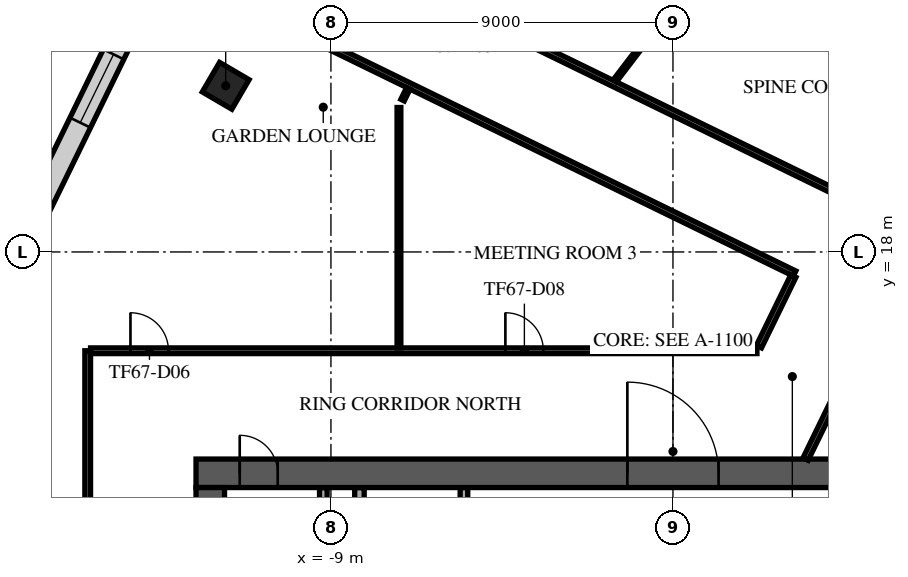
"""IFC4 building model, lengths in metres.
Left out: names, types, materials, properties, quantities, classifications, styles, units other than length and angle.
Written with IfcOpenShell. Run it as: python <this file> out.ifc"""

import sys

from ifc_helpers import new_model, si_unit, direction, frame, frame_2d, origin, origin_2d, place, context, subcontext, project, spatial, rectangle, extrude, element, fill, save


model = new_model("IFC4")
c1 = context("Model", 3, precision=1e-05, world=origin(), true_north=direction((0.0, 1.0)))
c2 = subcontext(c1, "Body", "Model", "MODEL_VIEW")
j1 = project(units=[si_unit("LENGTHUNIT", "METRE"), si_unit("PLANEANGLEUNIT", "RADIAN")], contexts=[c1])
p1 = place(None, origin())
s1 = spatial("IfcSite", under=j1, at=p1, CompositionType="ELEMENT")
p2 = place(p1, origin())
s2 = spatial("IfcBuilding", under=s1, at=p2, CompositionType="ELEMENT")
p3 = place(p2, frame((0.0, 0.0, 282.9)))
s3 = spatial("IfcBuildingStorey", under=s2, at=p3, CompositionType="ELEMENT", Elevation=282.9)
p4 = place(p3, frame((-11.769, 22.372, 0.0), z_axis=(0.0, 0.0, 1.0), x_axis=(0.504643651291, 0.863327739165, 0.0)))
e1 = element("IfcColumn", 1, at=p4, inside=s3, PredefinedType="COLUMN", context=c2, shape_type="SweptSolid", body=[
    extrude(rectangle(XDim=0.9, YDim=0.9, at=origin_2d()), origin(), (0.0, 0.0, 1.0), 4.0),
])
p5 = place(p3, frame((-12.55, 12.175, 0.0), z_axis=(0.0, 0.0, 1.0), x_axis=(1.0, 0.0, 0.0)))
e2 = element("IfcWall", 2, at=p5, inside=s3, PredefinedType="SHEAR", context=c2, shape_type="SweptSolid", body=[
    extrude(rectangle(XDim=25.1, YDim=0.75, at=frame_2d((12.55, 0.0))), origin(), (0.0, 0.0, 1.0), 3.64),
])
p6 = place(p5, frame((11.35, 0.0, 0.0)))
e3 = element("IfcOpeningElement", 3, at=p6, cuts=e2, PredefinedType="OPENING", context=c2, shape_type="SweptSolid", body=[
    extrude(rectangle(XDim=2.4, YDim=2.4, at=frame_2d((1.2, 1.2))), frame((0.0, 0.385, 0.0), z_axis=(0.0, -1.0, 0.0), x_axis=(1.0, 0.0, 0.0)), (0.0, 0.0, 1.0), 0.77),
])
p7 = place(p5, frame((22.175, 0.0, 0.0)))
e4 = element("IfcOpeningElement", 4, at=p7, cuts=e2, PredefinedType="OPENING", context=c2, shape_type="SweptSolid", body=[
    extrude(rectangle(XDim=1.2, YDim=2.1, at=frame_2d((0.6, 1.05))), frame((0.0, 0.385, 0.0), z_axis=(0.0, -1.0, 0.0), x_axis=(1.0, 0.0, 0.0)), (0.0, 0.0, 1.0), 0.77),
])
p8 = place(p5, frame((1.15, 0.0, 0.0)))
e5 = element("IfcOpeningElement", 5, at=p8, cuts=e2, PredefinedType="OPENING", context=c2, shape_type="SweptSolid", body=[
    extrude(rectangle(XDim=1.0, YDim=2.1, at=frame_2d((0.5, 1.05))), frame((0.0, 0.385, 0.0), z_axis=(0.0, -1.0, 0.0), x_axis=(1.0, 0.0, 0.0)), (0.0, 0.0, 1.0), 0.77),
])
p9 = place(p3, frame((-12.175, -11.8, 0.0), z_axis=(0.0, 0.0, 1.0), x_axis=(0.0, 1.0, 0.0)))
e6 = element("IfcWall", 6, at=p9, inside=s3, PredefinedType="SHEAR", context=c2, shape_type="SweptSolid", body=[
    extrude(rectangle(XDim=23.6, YDim=0.75, at=frame_2d((11.8, 0.0))), origin(), (0.0, 0.0, 1.0), 3.64),
])
p10 = place(p9, frame((10.6, 0.0, 0.0)))
e7 = element("IfcOpeningElement", 7, at=p10, cuts=e6, PredefinedType="OPENING", context=c2, shape_type="SweptSolid", body=[
    extrude(rectangle(XDim=2.4, YDim=2.4, at=frame_2d((1.2, 1.2))), frame((0.0, 0.385, 0.0), z_axis=(0.0, -1.0, 0.0), x_axis=(1.0, 0.0, 0.0)), (0.0, 0.0, 1.0), 0.77),
])
p11 = place(p3, frame((-9.2, 4.78, 0.0), z_axis=(0.0, 0.0, 1.0), x_axis=(0.0, 1.0, 0.0)))
e8 = element("IfcWall", 8, at=p11, inside=s3, PredefinedType="PARTITIONING", context=c2, shape_type="SweptSolid", body=[
    extrude(rectangle(XDim=7.015, YDim=0.2, at=frame_2d((3.507, 0.0))), origin(), (0.0, 0.0, 1.0), 3.64),
])
p12 = place(p11, frame((2.92, 0.0, 0.0)))
e9 = element("IfcOpeningElement", 9, at=p12, cuts=e8, PredefinedType="OPENING", context=c2, shape_type="SweptSolid", body=[
    extrude(rectangle(XDim=1.0, YDim=2.1, at=frame_2d((0.5, 1.05))), frame((0.0, 0.11, 0.0), z_axis=(0.0, -1.0, 0.0), x_axis=(1.0, 0.0, 0.0)), (0.0, 0.0, 1.0), 0.22),
])
p13 = place(p3, frame((-8.25, 8.805, 0.0), z_axis=(0.0, 0.0, 1.0), x_axis=(0.0, 1.0, 0.0)))
e10 = element("IfcWall", 10, at=p13, inside=s3, PredefinedType="PARTITIONING", context=c2, shape_type="SweptSolid", body=[
    extrude(rectangle(XDim=2.99, YDim=0.25, at=frame_2d((1.495, 0.0))), origin(), (0.0, 0.0, 1.0), 3.64),
])
p14 = place(p13, frame((0.895, 0.0, 0.0)))
e11 = element("IfcOpeningElement", 11, at=p14, cuts=e10, PredefinedType="OPENING", context=c2, shape_type="SweptSolid", body=[
    extrude(rectangle(XDim=1.0, YDim=2.1, at=frame_2d((0.5, 1.05))), frame((0.0, 0.135, 0.0), z_axis=(0.0, -1.0, 0.0), x_axis=(1.0, 0.0, 0.0)), (0.0, 0.0, 1.0), 0.27),
])
p15 = place(p3, frame((-5.5, 8.805, 0.0), z_axis=(0.0, 0.0, 1.0), x_axis=(0.0, 1.0, 0.0)))
e12 = element("IfcWall", 12, at=p15, inside=s3, PredefinedType="PARTITIONING", context=c2, shape_type="SweptSolid", body=[
    extrude(rectangle(XDim=2.99, YDim=0.2, at=frame_2d((1.495, 0.0))), origin(), (0.0, 0.0, 1.0), 3.64),
])
p16 = place(p15, frame((0.532, 0.0, 0.0)))
e13 = element("IfcOpeningElement", 13, at=p16, cuts=e12, PredefinedType="OPENING", context=c2, shape_type="SweptSolid", body=[
    extrude(rectangle(XDim=1.8, YDim=2.1, at=frame_2d((0.9, 1.05))), frame((0.0, 0.11, 0.0), z_axis=(0.0, -1.0, 0.0), x_axis=(1.0, 0.0, 0.0)), (0.0, 0.0, 1.0), 0.22),
])
p17 = place(p3, frame((-10.292, 32.278, 0.0), z_axis=(0.0, 0.0, 1.0), x_axis=(-0.438370550468, -0.898794337144, 0.0)))
e14 = element("IfcWall", 14, at=p17, inside=s3, PredefinedType="STANDARD", context=c2, shape_type="SweptSolid", body=[
    extrude(rectangle(XDim=48.843, YDim=0.6, at=frame_2d((24.421, 0.0))), origin(), (0.0, 0.0, 1.0), 3.64),
])
p18 = place(p17, frame((1.22, 0.0, 0.9)))
e15 = element("IfcOpeningElement", 15, at=p18, cuts=e14, PredefinedType="OPENING", context=c2, shape_type="SweptSolid", body=[
    extrude(rectangle(XDim=2.0, YDim=2.1, at=frame_2d((1.0, 1.05))), frame((0.0, 0.31, 0.0), z_axis=(0.0, -1.0, 0.0), x_axis=(1.0, 0.0, 0.0)), (0.0, 0.0, 1.0), 0.62),
])
p19 = place(p17, frame((5.66, 0.0, 0.9)))
e16 = element("IfcOpeningElement", 16, at=p19, cuts=e14, PredefinedType="OPENING", context=c2, shape_type="SweptSolid", body=[
    extrude(rectangle(XDim=2.0, YDim=2.1, at=frame_2d((1.0, 1.05))), frame((0.0, 0.31, 0.0), z_axis=(0.0, -1.0, 0.0), x_axis=(1.0, 0.0, 0.0)), (0.0, 0.0, 1.0), 0.62),
])
p20 = place(p17, frame((10.101, 0.0, 0.9)))
e17 = element("IfcOpeningElement", 17, at=p20, cuts=e14, PredefinedType="OPENING", context=c2, shape_type="SweptSolid", body=[
    extrude(rectangle(XDim=2.0, YDim=2.1, at=frame_2d((1.0, 1.05))), frame((0.0, 0.31, 0.0), z_axis=(0.0, -1.0, 0.0), x_axis=(1.0, 0.0, 0.0)), (0.0, 0.0, 1.0), 0.62),
])
p21 = place(p17, frame((14.541, 0.0, 0.9)))
e18 = element("IfcOpeningElement", 18, at=p21, cuts=e14, PredefinedType="OPENING", context=c2, shape_type="SweptSolid", body=[
    extrude(rectangle(XDim=2.0, YDim=2.1, at=frame_2d((1.0, 1.05))), frame((0.0, 0.31, 0.0), z_axis=(0.0, -1.0, 0.0), x_axis=(1.0, 0.0, 0.0)), (0.0, 0.0, 1.0), 0.62),
])
p22 = place(p17, frame((18.981, 0.0, 0.9)))
e19 = element("IfcOpeningElement", 19, at=p22, cuts=e14, PredefinedType="OPENING", context=c2, shape_type="SweptSolid", body=[
    extrude(rectangle(XDim=2.0, YDim=2.1, at=frame_2d((1.0, 1.05))), frame((0.0, 0.31, 0.0), z_axis=(0.0, -1.0, 0.0), x_axis=(1.0, 0.0, 0.0)), (0.0, 0.0, 1.0), 0.62),
])
p23 = place(p17, frame((23.422, 0.0, 0.9)))
e20 = element("IfcOpeningElement", 20, at=p23, cuts=e14, PredefinedType="OPENING", context=c2, shape_type="SweptSolid", body=[
    extrude(rectangle(XDim=2.0, YDim=2.1, at=frame_2d((1.0, 1.05))), frame((0.0, 0.31, 0.0), z_axis=(0.0, -1.0, 0.0), x_axis=(1.0, 0.0, 0.0)), (0.0, 0.0, 1.0), 0.62),
])
p24 = place(p17, frame((27.862, 0.0, 0.9)))
e21 = element("IfcOpeningElement", 21, at=p24, cuts=e14, PredefinedType="OPENING", context=c2, shape_type="SweptSolid", body=[
    extrude(rectangle(XDim=2.0, YDim=2.1, at=frame_2d((1.0, 1.05))), frame((0.0, 0.31, 0.0), z_axis=(0.0, -1.0, 0.0), x_axis=(1.0, 0.0, 0.0)), (0.0, 0.0, 1.0), 0.62),
])
p25 = place(p17, frame((32.302, 0.0, 0.9)))
e22 = element("IfcOpeningElement", 22, at=p25, cuts=e14, PredefinedType="OPENING", context=c2, shape_type="SweptSolid", body=[
    extrude(rectangle(XDim=2.0, YDim=2.1, at=frame_2d((1.0, 1.05))), frame((0.0, 0.31, 0.0), z_axis=(0.0, -1.0, 0.0), x_axis=(1.0, 0.0, 0.0)), (0.0, 0.0, 1.0), 0.62),
])
p26 = place(p17, frame((36.742, 0.0, 0.9)))
e23 = element("IfcOpeningElement", 23, at=p26, cuts=e14, PredefinedType="OPENING", context=c2, shape_type="SweptSolid", body=[
    extrude(rectangle(XDim=2.0, YDim=2.1, at=frame_2d((1.0, 1.05))), frame((0.0, 0.31, 0.0), z_axis=(0.0, -1.0, 0.0), x_axis=(1.0, 0.0, 0.0)), (0.0, 0.0, 1.0), 0.62),
])
p27 = place(p17, frame((41.183, 0.0, 0.9)))
e24 = element("IfcOpeningElement", 24, at=p27, cuts=e14, PredefinedType="OPENING", context=c2, shape_type="SweptSolid", body=[
    extrude(rectangle(XDim=2.0, YDim=2.1, at=frame_2d((1.0, 1.05))), frame((0.0, 0.31, 0.0), z_axis=(0.0, -1.0, 0.0), x_axis=(1.0, 0.0, 0.0)), (0.0, 0.0, 1.0), 0.62),
])
p28 = place(p17, frame((45.623, 0.0, 0.9)))
e25 = element("IfcOpeningElement", 25, at=p28, cuts=e14, PredefinedType="OPENING", context=c2, shape_type="SweptSolid", body=[
    extrude(rectangle(XDim=2.0, YDim=2.1, at=frame_2d((1.0, 1.05))), frame((0.0, 0.31, 0.0), z_axis=(0.0, -1.0, 0.0), x_axis=(1.0, 0.0, 0.0)), (0.0, 0.0, 1.0), 0.62),
])
p29 = place(p3, frame((29.237, 18.785, 0.0), z_axis=(0.0, 0.0, 1.0), x_axis=(-0.898794534192, 0.438370146458, 0.0)))
e26 = element("IfcWall", 26, at=p29, inside=s3, PredefinedType="STANDARD", context=c2, shape_type="SweptSolid", body=[
    extrude(rectangle(XDim=36.243, YDim=0.6, at=frame_2d((18.122, 0.0))), origin(), (0.0, 0.0, 1.0), 3.64),
])
p30 = place(p29, frame((1.215, 0.0, 0.9)))
e27 = element("IfcOpeningElement", 27, at=p30, cuts=e26, PredefinedType="OPENING", context=c2, shape_type="SweptSolid", body=[
    extrude(rectangle(XDim=2.1, YDim=2.1, at=frame_2d((1.05, 1.05))), frame((0.0, 0.31, 0.0), z_axis=(0.0, -1.0, 0.0), x_axis=(1.0, 0.0, 0.0)), (0.0, 0.0, 1.0), 0.62),
])
p31 = place(p29, frame((5.746, 0.0, 0.9)))
e28 = element("IfcOpeningElement", 28, at=p31, cuts=e26, PredefinedType="OPENING", context=c2, shape_type="SweptSolid", body=[
    extrude(rectangle(XDim=2.1, YDim=2.1, at=frame_2d((1.05, 1.05))), frame((0.0, 0.31, 0.0), z_axis=(0.0, -1.0, 0.0), x_axis=(1.0, 0.0, 0.0)), (0.0, 0.0, 1.0), 0.62),
])
p32 = place(p29, frame((10.276, 0.0, 0.9)))
e29 = element("IfcOpeningElement", 29, at=p32, cuts=e26, PredefinedType="OPENING", context=c2, shape_type="SweptSolid", body=[
    extrude(rectangle(XDim=2.1, YDim=2.1, at=frame_2d((1.05, 1.05))), frame((0.0, 0.31, 0.0), z_axis=(0.0, -1.0, 0.0), x_axis=(1.0, 0.0, 0.0)), (0.0, 0.0, 1.0), 0.62),
])
p33 = place(p29, frame((14.806, 0.0, 0.9)))
e30 = element("IfcOpeningElement", 30, at=p33, cuts=e26, PredefinedType="OPENING", context=c2, shape_type="SweptSolid", body=[
    extrude(rectangle(XDim=2.1, YDim=2.1, at=frame_2d((1.05, 1.05))), frame((0.0, 0.31, 0.0), z_axis=(0.0, -1.0, 0.0), x_axis=(1.0, 0.0, 0.0)), (0.0, 0.0, 1.0), 0.62),
])
p34 = place(p29, frame((19.337, 0.0, 0.9)))
e31 = element("IfcOpeningElement", 31, at=p34, cuts=e26, PredefinedType="OPENING", context=c2, shape_type="SweptSolid", body=[
    extrude(rectangle(XDim=2.1, YDim=2.1, at=frame_2d((1.05, 1.05))), frame((0.0, 0.31, 0.0), z_axis=(0.0, -1.0, 0.0), x_axis=(1.0, 0.0, 0.0)), (0.0, 0.0, 1.0), 0.62),
])
p35 = place(p29, frame((23.867, 0.0, 0.9)))
e32 = element("IfcOpeningElement", 32, at=p35, cuts=e26, PredefinedType="OPENING", context=c2, shape_type="SweptSolid", body=[
    extrude(rectangle(XDim=2.1, YDim=2.1, at=frame_2d((1.05, 1.05))), frame((0.0, 0.31, 0.0), z_axis=(0.0, -1.0, 0.0), x_axis=(1.0, 0.0, 0.0)), (0.0, 0.0, 1.0), 0.62),
])
p36 = place(p29, frame((28.398, 0.0, 0.9)))
e33 = element("IfcOpeningElement", 33, at=p36, cuts=e26, PredefinedType="OPENING", context=c2, shape_type="SweptSolid", body=[
    extrude(rectangle(XDim=2.1, YDim=2.1, at=frame_2d((1.05, 1.05))), frame((0.0, 0.31, 0.0), z_axis=(0.0, -1.0, 0.0), x_axis=(1.0, 0.0, 0.0)), (0.0, 0.0, 1.0), 0.62),
])
p37 = place(p29, frame((32.928, 0.0, 0.9)))
e34 = element("IfcOpeningElement", 34, at=p37, cuts=e26, PredefinedType="OPENING", context=c2, shape_type="SweptSolid", body=[
    extrude(rectangle(XDim=2.1, YDim=2.1, at=frame_2d((1.05, 1.05))), frame((0.0, 0.31, 0.0), z_axis=(0.0, -1.0, 0.0), x_axis=(1.0, 0.0, 0.0)), (0.0, 0.0, 1.0), 0.62),
])
p38 = place(p3, frame((-15.4, -11.363, 0.0), z_axis=(0.0, 0.0, 1.0), x_axis=(0.0, 1.0, 0.0)))
e35 = element("IfcWall", 35, at=p38, inside=s3, PredefinedType="PARTITIONING", context=c2, shape_type="SweptSolid", body=[
    extrude(rectangle(XDim=26.763, YDim=0.15, at=frame_2d((13.381, 0.0))), origin(), (0.0, 0.0, 1.0), 3.24),
])
p39 = place(p38, frame((3.3, 0.0, 0.0)))
e36 = element("IfcOpeningElement", 36, at=p39, cuts=e35, PredefinedType="OPENING", context=c2, shape_type="SweptSolid", body=[
    extrude(rectangle(XDim=1.0, YDim=2.1, at=frame_2d((0.5, 1.05))), frame((0.0, 0.085, 0.0), z_axis=(0.0, -1.0, 0.0), x_axis=(1.0, 0.0, 0.0)), (0.0, 0.0, 1.0), 0.17),
])
p40 = place(p38, frame((13.067, 0.0, 0.0)))
e37 = element("IfcOpeningElement", 37, at=p40, cuts=e35, PredefinedType="OPENING", context=c2, shape_type="SweptSolid", body=[
    extrude(rectangle(XDim=1.0, YDim=2.1, at=frame_2d((0.5, 1.05))), frame((0.0, 0.085, 0.0), z_axis=(0.0, -1.0, 0.0), x_axis=(1.0, 0.0, 0.0)), (0.0, 0.0, 1.0), 0.17),
])
p41 = place(p3, frame((-15.325, 15.4, 0.0), z_axis=(0.0, 0.0, 1.0), x_axis=(1.0, 0.0, 0.0)))
e38 = element("IfcWall", 38, at=p41, inside=s3, PredefinedType="PARTITIONING", context=c2, shape_type="SweptSolid", body=[
    extrude(rectangle(XDim=17.535, YDim=0.15, at=frame_2d((8.768, 0.0))), origin(), (0.0, 0.0, 1.0), 3.24),
])
p42 = place(p41, frame((1.05, 0.0, 0.0)))
e39 = element("IfcOpeningElement", 39, at=p42, cuts=e38, PredefinedType="OPENING", context=c2, shape_type="SweptSolid", body=[
    extrude(rectangle(XDim=1.0, YDim=2.1, at=frame_2d((0.5, 1.05))), frame((0.0, 0.085, 0.0), z_axis=(0.0, -1.0, 0.0), x_axis=(1.0, 0.0, 0.0)), (0.0, 0.0, 1.0), 0.17),
])
p43 = place(p41, frame((10.915, 0.0, 0.0)))
e40 = element("IfcOpeningElement", 40, at=p43, cuts=e38, PredefinedType="OPENING", context=c2, shape_type="SweptSolid", body=[
    extrude(rectangle(XDim=1.0, YDim=2.1, at=frame_2d((0.5, 1.05))), frame((0.0, 0.085, 0.0), z_axis=(0.0, -1.0, 0.0), x_axis=(1.0, 0.0, 0.0)), (0.0, 0.0, 1.0), 0.17),
])
p44 = place(p3, frame((-10.156, 23.947, 0.0), z_axis=(0.0, 0.0, 1.0), x_axis=(0.898773813872, -0.438412626983, 0.0)))
e41 = element("IfcWall", 41, at=p44, inside=s3, PredefinedType="PARTITIONING", context=c2, shape_type="SweptSolid", body=[
    extrude(rectangle(XDim=14.861, YDim=0.15, at=frame_2d((7.43, 0.0))), origin(), (0.0, 0.0, 1.0), 3.04),
])
p45 = place(p3, frame((-9.104, 26.104, 0.0), z_axis=(0.0, 0.0, 1.0), x_axis=(0.898795233888, -0.438368711864, 0.0)))
e42 = element("IfcWall", 42, at=p45, inside=s3, PredefinedType="PARTITIONING", context=c2, shape_type="SweptSolid", body=[
    extrude(rectangle(XDim=39.325, YDim=0.15, at=frame_2d((19.663, 0.0))), origin(), (0.0, 0.0, 1.0), 3.04),
])
p46 = place(p45, frame((2.8, 0.0, 0.0)))
e43 = element("IfcOpeningElement", 43, at=p46, cuts=e42, PredefinedType="OPENING", context=c2, shape_type="SweptSolid", body=[
    extrude(rectangle(XDim=1.8, YDim=2.1, at=frame_2d((0.9, 1.05))), frame((0.0, 0.085, 0.0), z_axis=(0.0, -1.0, 0.0), x_axis=(1.0, 0.0, 0.0)), (0.0, 0.0, 1.0), 0.17),
])
p47 = place(p45, frame((15.419, 0.0, 0.0)))
e44 = element("IfcOpeningElement", 44, at=p47, cuts=e42, PredefinedType="OPENING", context=c2, shape_type="SweptSolid", body=[
    extrude(rectangle(XDim=1.0, YDim=2.1, at=frame_2d((0.5, 1.05))), frame((0.0, 0.085, 0.0), z_axis=(0.0, -1.0, 0.0), x_axis=(1.0, 0.0, 0.0)), (0.0, 0.0, 1.0), 0.17),
])
p48 = place(p45, frame((19.371, 0.0, 0.0)))
e45 = element("IfcOpeningElement", 45, at=p48, cuts=e42, PredefinedType="OPENING", context=c2, shape_type="SweptSolid", body=[
    extrude(rectangle(XDim=1.0, YDim=2.1, at=frame_2d((0.5, 1.05))), frame((0.0, 0.085, 0.0), z_axis=(0.0, -1.0, 0.0), x_axis=(1.0, 0.0, 0.0)), (0.0, 0.0, 1.0), 0.17),
])
p49 = place(p3, frame((2.263, 15.508, 0.0), z_axis=(0.0, 0.0, 1.0), x_axis=(0.438351446917, 0.898803654301, 0.0)))
e46 = element("IfcWall", 46, at=p49, inside=s3, PredefinedType="PARTITIONING", context=c2, shape_type="SweptSolid", body=[
    extrude(rectangle(XDim=2.066, YDim=0.15, at=frame_2d((1.033, 0.0))), origin(), (0.0, 0.0, 1.0), 3.64),
])
p50 = place(p3, frame((3.49, 12.55, 0.0), z_axis=(0.0, 0.0, 1.0), x_axis=(0.438553431108, 0.898705117412, 0.0)))
e47 = element("IfcWall", 47, at=p50, inside=s3, PredefinedType="PARTITIONING", context=c2, shape_type="SweptSolid", body=[
    extrude(rectangle(XDim=4.261, YDim=0.15, at=frame_2d((2.131, 0.0))), origin(), (0.0, 0.0, 1.0), 3.24),
])
p51 = place(p3, frame((-7.21, 15.475, 0.0), z_axis=(0.0, 0.0, 1.0), x_axis=(0.0, 1.0, 0.0)))
e48 = element("IfcWall", 48, at=p51, inside=s3, PredefinedType="PARTITIONING", context=c2, shape_type="SweptSolid", body=[
    extrude(rectangle(XDim=6.326, YDim=0.1, at=frame_2d((3.163, 0.0))), origin(), (0.0, 0.0, 1.0), 3.24),
])
p52 = place(p3, frame((-7.115, 21.995, 0.0), z_axis=(0.0, 0.0, 1.0), x_axis=(0.439020539002, 0.898477026047, 0.0)))
e49 = element("IfcWall", 49, at=p52, inside=s3, PredefinedType="PARTITIONING", context=c2, shape_type="SweptSolid", body=[
    extrude(rectangle(XDim=0.346, YDim=0.1, at=frame_2d((0.173, 0.0))), origin(), (0.0, 0.0, 1.0), 3.64),
])
p53 = place(p3, frame((-1.529, 22.504, 0.0), z_axis=(0.0, 0.0, 1.0), x_axis=(0.607088982963, 0.794633857046, 0.0)))
e50 = element("IfcWall", 50, at=p53, inside=s3, PredefinedType="PARTITIONING", context=c2, shape_type="SweptSolid", body=[
    extrude(rectangle(XDim=10.039, YDim=0.1, at=frame_2d((5.02, 0.0))), origin(), (0.0, 0.0, 1.0), 3.04),
])
p54 = place(p6, origin())
e51 = element("IfcDoor", 51, at=p54, inside=s3, OperationType="SINGLE_SWING_LEFT", PredefinedType="DOOR", context=c2, shape_type="SweptSolid", body=[
    extrude(rectangle(XDim=2.4, YDim=2.4, at=frame_2d((1.2, 1.2))), frame((0.0, 0.025, 0.0), z_axis=(0.0, -1.0, 0.0), x_axis=(1.0, 0.0, 0.0)), (0.0, 0.0, 1.0), 0.05),
])
fill(e3, e51)
p55 = place(p8, origin())
e52 = element("IfcDoor", 52, at=p55, inside=s3, OperationType="SINGLE_SWING_LEFT", PredefinedType="DOOR", context=c2, shape_type="SweptSolid", body=[
    extrude(rectangle(XDim=1.0, YDim=2.1, at=frame_2d((0.5, 1.05))), frame((0.0, 0.025, 0.0), z_axis=(0.0, -1.0, 0.0), x_axis=(1.0, 0.0, 0.0)), (0.0, 0.0, 1.0), 0.05),
])
fill(e5, e52)
p56 = place(p20, origin())
e53 = element("IfcWindow", 53, at=p56, inside=s3, PartitioningType="SINGLE_PANEL", PredefinedType="WINDOW", context=c2, shape_type="SweptSolid", body=[
    extrude(rectangle(XDim=2.0, YDim=2.1, at=frame_2d((1.0, 1.05))), frame((0.0, 0.03, 0.0), z_axis=(0.0, -1.0, 0.0), x_axis=(1.0, 0.0, 0.0)), (0.0, 0.0, 1.0), 0.06),
])
fill(e17, e53)
p57 = place(p42, origin())
e54 = element("IfcDoor", 54, at=p57, inside=s3, OperationType="SINGLE_SWING_LEFT", PredefinedType="DOOR", context=c2, shape_type="SweptSolid", body=[
    extrude(rectangle(XDim=1.0, YDim=2.1, at=frame_2d((0.5, 1.05))), frame((0.0, 0.025, 0.0), z_axis=(0.0, -1.0, 0.0), x_axis=(1.0, 0.0, 0.0)), (0.0, 0.0, 1.0), 0.05),
])
fill(e39, e54)
p58 = place(p43, origin())
e55 = element("IfcDoor", 55, at=p58, inside=s3, OperationType="SINGLE_SWING_RIGHT", PredefinedType="DOOR", context=c2, shape_type="SweptSolid", body=[
    extrude(rectangle(XDim=1.0, YDim=2.1, at=frame_2d((0.5, 1.05))), frame((0.0, 0.025, 0.0), z_axis=(0.0, -1.0, 0.0), x_axis=(1.0, 0.0, 0.0)), (0.0, 0.0, 1.0), 0.05),
])
fill(e40, e55)
save(model, sys.argv[1])
